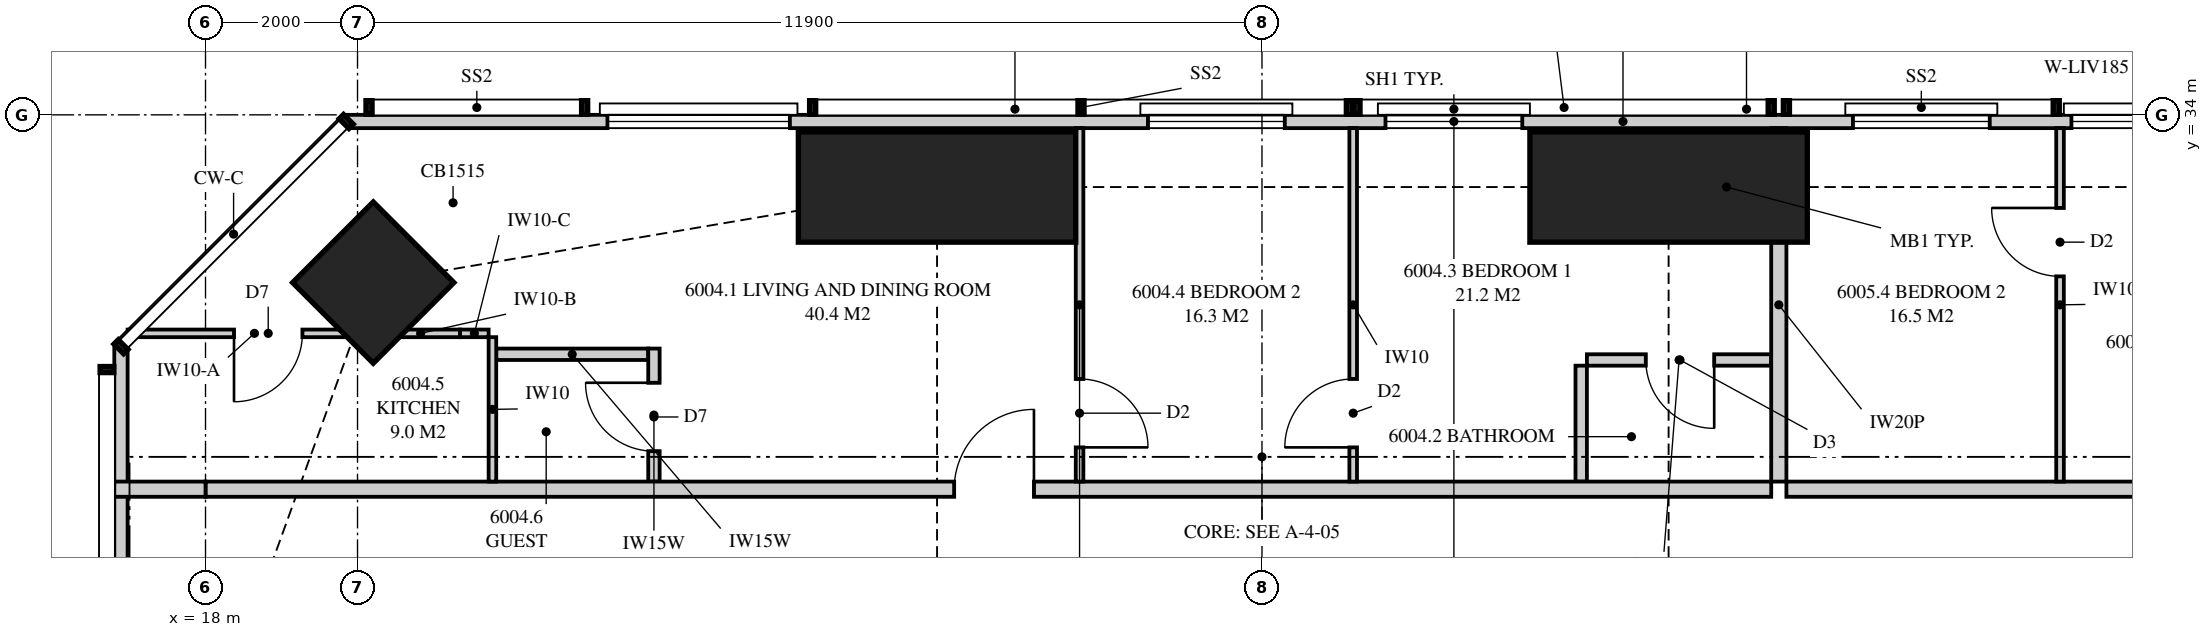
"""IFC4 building model, lengths in metres.
Left out: names, types, materials, properties, quantities, classifications, styles, units other than length and angle.
Written with IfcOpenShell. Run it as: python <this file> out.ifc"""

import sys

from ifc_helpers import new_model, si_unit, direction, frame, frame_2d, origin, origin_2d, place, context, subcontext, project, spatial, polyline, rectangle, hollow_rectangle, outline, extrude, element, fill, save


model = new_model("IFC4")
c1 = context("Model", 3, precision=1e-05, world=origin(), true_north=direction((0.0, 1.0)))
c2 = subcontext(c1, "Body", "Model", "MODEL_VIEW")
j1 = project(units=[si_unit("LENGTHUNIT", "METRE"), si_unit("PLANEANGLEUNIT", "RADIAN")], contexts=[c1])
p1 = place(None, origin())
s1 = spatial("IfcSite", under=j1, at=p1, CompositionType="ELEMENT")
p2 = place(p1, origin())
s2 = spatial("IfcBuilding", under=s1, at=p2, CompositionType="ELEMENT")
p3 = place(p2, frame((0.0, 0.0, 221.45)))
s3 = spatial("IfcBuildingStorey", under=s2, at=p3, CompositionType="ELEMENT", Elevation=221.45)
for number, where, z_axis, x_axis in (
    (1, (37.25, 33.05, 0.0), (0.0, 0.0, 1.0), (0.0, 1.0, 0.0)),
    (2, (27.625, 33.05, 0.0), (0.0, 0.0, 1.0), (0.0, 1.0, 0.0)),
):
    element("IfcColumn", number, at=place(p3, frame(where, z_axis=z_axis, x_axis=x_axis)), inside=s3, PredefinedType="COLUMN", context=c2, shape_type="SweptSolid", body=[
        extrude(rectangle(XDim=1.45, YDim=3.65, at=origin_2d()), origin(), (0.0, 0.0, 1.0), 3.5),
    ])
p4 = place(p3, frame((20.207, 31.793, 0.0), z_axis=(0.0, 0.0, 1.0), x_axis=(0.707106781187, -0.707106781187, 0.0)))
e3 = element("IfcColumn", 3, at=p4, inside=s3, PredefinedType="COLUMN", context=c2, shape_type="SweptSolid", body=[
    extrude(hollow_rectangle(XDim=1.5, YDim=1.5, WallThickness=0.125, at=origin_2d()), origin(), (0.0, 0.0, 1.0), 3.5),
])
p5 = place(p3, frame((53.449, 33.913, 0.0), z_axis=(0.0, 0.0, 1.0), x_axis=(-1.0, 0.0, 0.0)))
e4 = element("IfcWall", 4, at=p5, inside=s3, PredefinedType="SOLIDWALL", context=c2, shape_type="SweptSolid", body=[
    extrude(outline(polyline([(0.0, 0.0), (33.597, 0.0), (33.597, 3.26), (26.039, 3.26), (26.039, 2.3), (25.955, 2.3), (25.955, 3.26), (25.824, 3.26), (25.824, 2.3), (6.574, 2.3), (6.574, 3.26), (6.442, 3.26), (6.442, 2.3), (6.359, 2.3), (6.359, 3.26), (0.0, 3.26), (0.0, 0.0)])), frame((0.0, 0.087, 0.0), z_axis=(0.0, -1.0, 0.0), x_axis=(1.0, 0.0, 0.0)), (0.0, 0.0, 1.0), 0.175),
])
p6 = place(p5, frame((0.6, 0.0, 0.0)))
e5 = element("IfcOpeningElement", 5, at=p6, cuts=e4, PredefinedType="OPENING", context=c2, shape_type="SweptSolid", body=[
    extrude(rectangle(XDim=1.8, YDim=2.25, at=frame_2d((0.9, 1.125))), frame((0.0, 0.097, 0.0), z_axis=(0.0, -1.0, 0.0), x_axis=(1.0, 0.0, 0.0)), (0.0, 0.0, 1.0), 0.195),
])
p7 = place(p5, frame((8.499, 0.0, 0.4)))
e6 = element("IfcOpeningElement", 6, at=p7, cuts=e4, PredefinedType="OPENING", context=c2, shape_type="SweptSolid", body=[
    extrude(rectangle(XDim=2.4, YDim=1.85, at=frame_2d((1.2, 0.925))), frame((0.0, 0.097, 0.0), z_axis=(0.0, -1.0, 0.0), x_axis=(1.0, 0.0, 0.0)), (0.0, 0.0, 1.0), 0.195),
])
p8 = place(p5, frame((11.974, 0.0, 0.4)))
e7 = element("IfcOpeningElement", 7, at=p8, cuts=e4, PredefinedType="OPENING", context=c2, shape_type="SweptSolid", body=[
    extrude(rectangle(XDim=1.8, YDim=1.85, at=frame_2d((0.9, 0.925))), frame((0.0, 0.097, 0.0), z_axis=(0.0, -1.0, 0.0), x_axis=(1.0, 0.0, 0.0)), (0.0, 0.0, 1.0), 0.195),
])
p9 = place(p5, frame((18.124, 0.0, 0.4)))
e8 = element("IfcOpeningElement", 8, at=p9, cuts=e4, PredefinedType="OPENING", context=c2, shape_type="SweptSolid", body=[
    extrude(rectangle(XDim=1.8, YDim=1.85, at=frame_2d((0.9, 0.925))), frame((0.0, 0.097, 0.0), z_axis=(0.0, -1.0, 0.0), x_axis=(1.0, 0.0, 0.0)), (0.0, 0.0, 1.0), 0.195),
])
p10 = place(p5, frame((21.249, 0.0, 0.4)))
e9 = element("IfcOpeningElement", 9, at=p10, cuts=e4, PredefinedType="OPENING", context=c2, shape_type="SweptSolid", body=[
    extrude(rectangle(XDim=1.8, YDim=1.85, at=frame_2d((0.9, 0.925))), frame((0.0, 0.097, 0.0), z_axis=(0.0, -1.0, 0.0), x_axis=(1.0, 0.0, 0.0)), (0.0, 0.0, 1.0), 0.195),
])
p11 = place(p5, frame((27.76, 0.0, 0.4)))
e10 = element("IfcOpeningElement", 10, at=p11, cuts=e4, PredefinedType="OPENING", context=c2, shape_type="SweptSolid", body=[
    extrude(rectangle(XDim=2.4, YDim=1.85, at=frame_2d((1.2, 0.925))), frame((0.0, 0.097, 0.0), z_axis=(0.0, -1.0, 0.0), x_axis=(1.0, 0.0, 0.0)), (0.0, 0.0, 1.0), 0.195),
])
p12 = place(p3, frame((16.887, 30.949, 0.0), z_axis=(0.0, 0.0, 1.0), x_axis=(0.0, -1.0, 0.0)))
e11 = element("IfcWall", 11, at=p12, inside=s3, PredefinedType="SOLIDWALL", context=c2, shape_type="SweptSolid", body=[
    extrude(outline(polyline([(0.0, 0.0), (27.897, 0.0), (27.897, 3.26), (18.148, 3.26), (18.148, 2.3), (18.125, 2.3), (18.125, 3.26), (17.949, 3.26), (17.949, 2.3), (5.949, 2.3), (5.949, 3.26), (0.0, 3.26), (0.0, 0.0)])), frame((0.0, 0.087, 0.0), z_axis=(0.0, -1.0, 0.0), x_axis=(1.0, 0.0, 0.0)), (0.0, 0.0, 1.0), 0.175),
])
p13 = place(p12, frame((11.849, 0.0, 0.4)))
e12 = element("IfcOpeningElement", 12, at=p13, cuts=e11, PredefinedType="OPENING", context=c2, shape_type="SweptSolid", body=[
    extrude(rectangle(XDim=1.2, YDim=1.85, at=frame_2d((0.6, 0.925))), frame((0.0, 0.097, 0.0), z_axis=(0.0, -1.0, 0.0), x_axis=(1.0, 0.0, 0.0)), (0.0, 0.0, 1.0), 0.195),
])
p14 = place(p12, frame((23.999, 0.0, 0.4)))
e13 = element("IfcOpeningElement", 13, at=p14, cuts=e11, PredefinedType="OPENING", context=c2, shape_type="SweptSolid", body=[
    extrude(rectangle(XDim=1.2, YDim=1.85, at=frame_2d((0.6, 0.925))), frame((0.0, 0.097, 0.0), z_axis=(0.0, -1.0, 0.0), x_axis=(1.0, 0.0, 0.0)), (0.0, 0.0, 1.0), 0.195),
])
p15 = place(p3, frame((38.7, 33.825, 0.0), z_axis=(0.0, 0.0, 1.0), x_axis=(0.0, -1.0, 0.0)))
e14 = element("IfcWall", 14, at=p15, inside=s3, PredefinedType="PARTITIONING", context=c2, shape_type="SweptSolid", body=[
    extrude(outline(polyline([(0.529, 2.3), (0.0, 2.3), (0.0, 0.0), (0.529, 0.0), (0.529, 0.052), (1.021, 0.052), (1.021, 0.0), (4.65, 0.0), (4.65, 3.26), (1.685, 3.26), (1.685, 2.3), (1.021, 2.3), (1.021, 2.249), (0.529, 2.249), (0.529, 2.3)])), frame((0.0, 0.1, 0.0), z_axis=(0.0, -1.0, 0.0), x_axis=(1.0, 0.0, 0.0)), (0.0, 0.0, 1.0), 0.2),
])
p16 = place(p3, frame((18.0, 29.075, 0.0), z_axis=(0.0, 0.0, 1.0), x_axis=(1.0, 0.0, 0.0)))
e15 = element("IfcWall", 15, at=p16, inside=s3, PredefinedType="PARTITIONING", context=c2, shape_type="SweptSolid", body=[
    extrude(outline(polyline([(0.0, 0.0), (20.6, 0.0), (20.6, 3.26), (20.56, 3.26), (20.56, 2.66), (17.94, 2.66), (17.94, 3.26), (10.935, 3.26), (10.935, 2.66), (8.315, 2.66), (8.315, 3.26), (2.192, 3.26), (2.192, 2.3), (0.256, 2.3), (0.256, 3.26), (0.0, 3.26), (0.0, 0.0)])), frame((0.0, 0.1, 0.0), z_axis=(0.0, -1.0, 0.0), x_axis=(1.0, 0.0, 0.0)), (0.0, 0.0, 1.0), 0.2),
])
p17 = place(p16, frame((9.85, 0.0, 0.0)))
e16 = element("IfcOpeningElement", 16, at=p17, cuts=e15, PredefinedType="OPENING", context=c2, shape_type="SweptSolid", body=[
    extrude(rectangle(XDim=1.05, YDim=2.2, at=frame_2d((0.525, 1.1))), frame((0.0, 0.11, 0.0), z_axis=(0.0, -1.0, 0.0), x_axis=(1.0, 0.0, 0.0)), (0.0, 0.0, 1.0), 0.22),
])
p18 = place(p3, frame((36.175, 30.775, 0.0), z_axis=(0.0, 0.0, 1.0), x_axis=(1.0, 0.0, 0.0)))
e17 = element("IfcWall", 17, at=p18, inside=s3, PredefinedType="PLUMBINGWALL", context=c2, shape_type="SweptSolid", body=[
    extrude(outline(polyline([(0.0, 0.0), (2.425, 0.0), (2.425, 3.26), (2.36, 3.26), (2.36, 2.66), (0.0, 2.66), (0.0, 3.26), (0.0, 0.0)])), frame((0.0, 0.075, 0.0), z_axis=(0.0, -1.0, 0.0), x_axis=(1.0, 0.0, 0.0)), (0.0, 0.0, 1.0), 0.15),
])
p19 = place(p18, frame((0.775, 0.0, 0.0)))
e18 = element("IfcOpeningElement", 18, at=p19, cuts=e17, PredefinedType="OPENING", context=c2, shape_type="SweptSolid", body=[
    extrude(rectangle(XDim=0.9, YDim=2.1, at=frame_2d((0.45, 1.05))), frame((0.0, 0.085, 0.0), z_axis=(0.0, -1.0, 0.0), x_axis=(1.0, 0.0, 0.0)), (0.0, 0.0, 1.0), 0.17),
])
p20 = place(p3, frame((36.1, 30.7, 0.0), z_axis=(0.0, 0.0, 1.0), x_axis=(0.0, -1.0, 0.0)))
e19 = element("IfcWall", 19, at=p20, inside=s3, PredefinedType="PLUMBINGWALL", context=c2, shape_type="SweptSolid", body=[
    extrude(outline(polyline([(0.0, 0.0), (1.525, 0.0), (1.525, 3.26), (1.525, 2.66), (0.0, 2.66), (0.0, 3.26), (0.0, 0.0)])), frame((0.0, 0.075, 0.0), z_axis=(0.0, -1.0, 0.0), x_axis=(1.0, 0.0, 0.0)), (0.0, 0.0, 1.0), 0.15),
])
p21 = place(p3, frame((33.1, 33.825, 0.0), z_axis=(0.0, 0.0, 1.0), x_axis=(0.0, -1.0, 0.0)))
e20 = element("IfcWall", 20, at=p21, inside=s3, PredefinedType="PARTITIONING", context=c2, shape_type="SweptSolid", body=[
    extrude(outline(polyline([(0.0, 0.0), (4.65, 0.0), (4.65, 3.26), (1.635, 3.26), (1.635, 2.3), (0.0, 2.3), (0.0, 3.26), (0.0, 0.0)])), frame((0.0, 0.05, 0.0), z_axis=(0.0, -1.0, 0.0), x_axis=(1.0, 0.0, 0.0)), (0.0, 0.0, 1.0), 0.1),
])
p22 = place(p21, frame((3.3, 0.0, 0.0)))
e21 = element("IfcOpeningElement", 21, at=p22, cuts=e20, PredefinedType="OPENING", context=c2, shape_type="SweptSolid", body=[
    extrude(rectangle(XDim=0.9, YDim=2.1, at=frame_2d((0.45, 1.05))), frame((0.0, 0.06, 0.0), z_axis=(0.0, -1.0, 0.0), x_axis=(1.0, 0.0, 0.0)), (0.0, 0.0, 1.0), 0.12),
])
p23 = place(p3, frame((29.5, 33.825, 0.0), z_axis=(0.0, 0.0, 1.0), x_axis=(0.0, -1.0, 0.0)))
e22 = element("IfcWall", 22, at=p23, inside=s3, PredefinedType="PARTITIONING", context=c2, shape_type="SweptSolid", body=[
    extrude(outline(polyline([(0.0, 0.0), (4.65, 0.0), (4.65, 3.26), (1.635, 3.26), (1.635, 2.3), (0.0, 2.3), (0.0, 3.26), (0.0, 0.0)])), frame((0.0, 0.05, 0.0), z_axis=(0.0, -1.0, 0.0), x_axis=(1.0, 0.0, 0.0)), (0.0, 0.0, 1.0), 0.1),
])
p24 = place(p23, frame((3.3, 0.0, 0.0)))
e23 = element("IfcOpeningElement", 23, at=p24, cuts=e22, PredefinedType="OPENING", context=c2, shape_type="SweptSolid", body=[
    extrude(rectangle(XDim=0.9, YDim=2.1, at=frame_2d((0.45, 1.05))), frame((0.0, 0.06, 0.0), z_axis=(0.0, -1.0, 0.0), x_axis=(1.0, 0.0, 0.0)), (0.0, 0.0, 1.0), 0.12),
])
p25 = place(p3, frame((16.975, 31.125, 0.0), z_axis=(0.0, 0.0, 1.0), x_axis=(1.0, 0.0, 0.0)))
e24 = element("IfcWall", 24, at=p25, inside=s3, PredefinedType="PARTITIONING", context=c2, shape_type="SweptSolid", body=[
    extrude(outline(polyline([(0.0, 0.0), (3.337, 0.0), (3.337, 2.3), (2.076, 2.3), (2.076, 3.26), (0.0, 3.26), (0.0, 0.0)])), frame((0.0, 0.05, 0.0), z_axis=(0.0, -1.0, 0.0), x_axis=(1.0, 0.0, 0.0)), (0.0, 0.0, 1.0), 0.1),
])
p26 = place(p25, frame((1.4, 0.0, 0.0)))
e25 = element("IfcOpeningElement", 25, at=p26, cuts=e24, PredefinedType="OPENING", context=c2, shape_type="SweptSolid", body=[
    extrude(rectangle(XDim=0.9, YDim=2.1, at=frame_2d((0.45, 1.05))), frame((0.0, 0.06, 0.0), z_axis=(0.0, -1.0, 0.0), x_axis=(1.0, 0.0, 0.0)), (0.0, 0.0, 1.0), 0.12),
])
p27 = place(p3, frame((20.312, 31.125, 0.0), z_axis=(0.0, 0.0, 1.0), x_axis=(1.0, 0.0, 0.0)))
e26 = element("IfcWall", 26, at=p27, inside=s3, PredefinedType="PARTITIONING", context=c2, shape_type="SweptSolid", body=[
    extrude(rectangle(XDim=1.037, YDim=0.1, at=frame_2d((0.519, 0.0))), origin(), (0.0, 0.0, 1.0), 2.3),
])
p28 = place(p3, frame((21.349, 31.125, 0.0), z_axis=(0.0, 0.0, 1.0), x_axis=(1.0, 0.0, 0.0)))
e27 = element("IfcWall", 27, at=p28, inside=s3, PredefinedType="PARTITIONING", context=c2, shape_type="SweptSolid", body=[
    extrude(outline(polyline([(0.0, 0.0), (0.376, 0.0), (0.376, 3.26), (0.064, 3.26), (0.064, 2.3), (0.0, 2.3), (0.0, 0.0)])), frame((0.0, 0.05, 0.0), z_axis=(0.0, -1.0, 0.0), x_axis=(1.0, 0.0, 0.0)), (0.0, 0.0, 1.0), 0.1),
])
p29 = place(p3, frame((21.775, 31.075, 0.0), z_axis=(0.0, 0.0, 1.0), x_axis=(0.0, -1.0, 0.0)))
e28 = element("IfcWall", 28, at=p29, inside=s3, PredefinedType="PARTITIONING", context=c2, shape_type="SweptSolid", body=[
    extrude(rectangle(XDim=1.9, YDim=0.1, at=frame_2d((0.95, 0.0))), origin(), (0.0, 0.0, 1.0), 3.26),
])
p30 = place(p3, frame((38.8, 29.075, 0.0), z_axis=(0.0, 0.0, 1.0), x_axis=(1.0, 0.0, 0.0)))
e29 = element("IfcWall", 29, at=p30, inside=s3, PredefinedType="PARTITIONING", context=c2, shape_type="SweptSolid", body=[
    extrude(outline(polyline([(0.0, 0.0), (7.075, 0.0), (7.075, 3.26), (7.075, 2.66), (6.765, 2.66), (6.765, 3.26), (0.0, 3.26), (0.0, 0.0)])), frame((0.0, 0.1, 0.0), z_axis=(0.0, -1.0, 0.0), x_axis=(1.0, 0.0, 0.0)), (0.0, 0.0, 1.0), 0.2),
])
p31 = place(p30, frame((5.875, 0.0, 0.0)))
e30 = element("IfcOpeningElement", 30, at=p31, cuts=e29, PredefinedType="OPENING", context=c2, shape_type="SweptSolid", body=[
    extrude(rectangle(XDim=1.05, YDim=2.2, at=frame_2d((0.525, 1.1))), frame((0.0, 0.11, 0.0), z_axis=(0.0, -1.0, 0.0), x_axis=(1.0, 0.0, 0.0)), (0.0, 0.0, 1.0), 0.22),
])
p32 = place(p3, frame((42.4, 33.825, 0.0), z_axis=(0.0, 0.0, 1.0), x_axis=(0.0, -1.0, 0.0)))
e31 = element("IfcWall", 31, at=p32, inside=s3, PredefinedType="PARTITIONING", context=c2, shape_type="SweptSolid", body=[
    extrude(outline(polyline([(0.0, 0.0), (4.65, 0.0), (4.65, 3.26), (1.635, 3.26), (1.635, 2.3), (0.0, 2.3), (0.0, 3.26), (0.0, 0.0)])), frame((0.0, 0.05, 0.0), z_axis=(0.0, -1.0, 0.0), x_axis=(1.0, 0.0, 0.0)), (0.0, 0.0, 1.0), 0.1),
])
p33 = place(p32, frame((1.05, 0.0, 0.0)))
e32 = element("IfcOpeningElement", 32, at=p33, cuts=e31, PredefinedType="OPENING", context=c2, shape_type="SweptSolid", body=[
    extrude(rectangle(XDim=0.9, YDim=2.1, at=frame_2d((0.45, 1.05))), frame((0.0, 0.06, 0.0), z_axis=(0.0, -1.0, 0.0), x_axis=(1.0, 0.0, 0.0)), (0.0, 0.0, 1.0), 0.12),
])
p34 = place(p3, frame((16.8, 29.075, 0.0), z_axis=(0.0, 0.0, 1.0), x_axis=(1.0, 0.0, 0.0)))
e33 = element("IfcWall", 33, at=p34, inside=s3, PredefinedType="PARTITIONING", context=c2, shape_type="SweptSolid", body=[
    extrude(rectangle(XDim=1.2, YDim=0.2, at=frame_2d((0.6, 0.0))), origin(), (0.0, 0.0, 1.0), 3.26),
])
p35 = place(p3, frame((23.9, 29.175, 0.0), z_axis=(0.0, 0.0, 1.0), x_axis=(0.0, 1.0, 0.0)))
e34 = element("IfcWall", 34, at=p35, inside=s3, PredefinedType="PLUMBINGWALL", context=c2, shape_type="SweptSolid", body=[
    extrude(rectangle(XDim=1.75, YDim=0.15, at=frame_2d((0.875, 0.0))), origin(), (0.0, 0.0, 1.0), 3.26),
])
p36 = place(p35, frame((0.4, 0.0, 0.0)))
e35 = element("IfcOpeningElement", 35, at=p36, cuts=e34, PredefinedType="OPENING", context=c2, shape_type="SweptSolid", body=[
    extrude(rectangle(XDim=0.9, YDim=2.1, at=frame_2d((0.45, 1.05))), frame((0.0, 0.085, 0.0), z_axis=(0.0, -1.0, 0.0), x_axis=(1.0, 0.0, 0.0)), (0.0, 0.0, 1.0), 0.17),
])
p37 = place(p3, frame((21.825, 30.85, 0.0), z_axis=(0.0, 0.0, 1.0), x_axis=(1.0, 0.0, 0.0)))
e36 = element("IfcWall", 36, at=p37, inside=s3, PredefinedType="PLUMBINGWALL", context=c2, shape_type="SweptSolid", body=[
    extrude(rectangle(XDim=2.0, YDim=0.15, at=frame_2d((1.0, 0.0))), origin(), (0.0, 0.0, 1.0), 3.26),
])
p38 = place(p7, origin())
e37 = element("IfcWindow", 37, at=p38, inside=s3, PartitioningType="SINGLE_PANEL", PredefinedType="WINDOW", context=c2, shape_type="SweptSolid", body=[
    extrude(rectangle(XDim=2.4, YDim=1.85, at=frame_2d((1.2, 0.925))), frame((0.0, 0.03, 0.0), z_axis=(0.0, -1.0, 0.0), x_axis=(1.0, 0.0, 0.0)), (0.0, 0.0, 1.0), 0.06),
])
fill(e6, e37)
p39 = place(p8, origin())
e38 = element("IfcWindow", 38, at=p39, inside=s3, PartitioningType="SINGLE_PANEL", PredefinedType="WINDOW", context=c2, shape_type="SweptSolid", body=[
    extrude(rectangle(XDim=1.8, YDim=1.85, at=frame_2d((0.9, 0.925))), frame((0.0, 0.03, 0.0), z_axis=(0.0, -1.0, 0.0), x_axis=(1.0, 0.0, 0.0)), (0.0, 0.0, 1.0), 0.06),
])
fill(e7, e38)
p40 = place(p9, origin())
e39 = element("IfcWindow", 39, at=p40, inside=s3, PartitioningType="SINGLE_PANEL", PredefinedType="WINDOW", context=c2, shape_type="SweptSolid", body=[
    extrude(rectangle(XDim=1.8, YDim=1.85, at=frame_2d((0.9, 0.925))), frame((0.0, 0.03, 0.0), z_axis=(0.0, -1.0, 0.0), x_axis=(1.0, 0.0, 0.0)), (0.0, 0.0, 1.0), 0.06),
])
fill(e8, e39)
p41 = place(p10, origin())
e40 = element("IfcWindow", 40, at=p41, inside=s3, PartitioningType="SINGLE_PANEL", PredefinedType="WINDOW", context=c2, shape_type="SweptSolid", body=[
    extrude(rectangle(XDim=1.8, YDim=1.85, at=frame_2d((0.9, 0.925))), frame((0.0, 0.03, 0.0), z_axis=(0.0, -1.0, 0.0), x_axis=(1.0, 0.0, 0.0)), (0.0, 0.0, 1.0), 0.06),
])
fill(e9, e40)
p42 = place(p11, origin())
e41 = element("IfcWindow", 41, at=p42, inside=s3, PartitioningType="SINGLE_PANEL", PredefinedType="WINDOW", context=c2, shape_type="SweptSolid", body=[
    extrude(rectangle(XDim=2.4, YDim=1.85, at=frame_2d((1.2, 0.925))), frame((0.0, 0.03, 0.0), z_axis=(0.0, -1.0, 0.0), x_axis=(1.0, 0.0, 0.0)), (0.0, 0.0, 1.0), 0.06),
])
fill(e10, e41)
p43 = place(p17, origin())
e42 = element("IfcDoor", 42, at=p43, inside=s3, OperationType="SINGLE_SWING_RIGHT", PredefinedType="DOOR", context=c2, shape_type="SweptSolid", body=[
    extrude(rectangle(XDim=1.05, YDim=2.2, at=frame_2d((0.525, 1.1))), frame((0.0, 0.025, 0.0), z_axis=(0.0, -1.0, 0.0), x_axis=(1.0, 0.0, 0.0)), (0.0, 0.0, 1.0), 0.05),
])
fill(e16, e42)
p44 = place(p19, frame((0.9, 0.0, 0.0), z_axis=(0.0, 0.0, 1.0), x_axis=(-1.0, 0.0, 0.0)))
e43 = element("IfcDoor", 43, at=p44, inside=s3, OperationType="SINGLE_SWING_LEFT", PredefinedType="DOOR", context=c2, shape_type="SweptSolid", body=[
    extrude(rectangle(XDim=0.9, YDim=2.1, at=frame_2d((0.45, 1.05))), frame((0.0, 0.025, 0.0), z_axis=(0.0, -1.0, 0.0), x_axis=(1.0, 0.0, 0.0)), (0.0, 0.0, 1.0), 0.05),
])
fill(e18, e43)
p45 = place(p22, frame((0.9, 0.0, 0.0), z_axis=(0.0, 0.0, 1.0), x_axis=(-1.0, 0.0, 0.0)))
e44 = element("IfcDoor", 44, at=p45, inside=s3, OperationType="SINGLE_SWING_LEFT", PredefinedType="DOOR", context=c2, shape_type="SweptSolid", body=[
    extrude(rectangle(XDim=0.9, YDim=2.1, at=frame_2d((0.45, 1.05))), frame((0.0, 0.025, 0.0), z_axis=(0.0, -1.0, 0.0), x_axis=(1.0, 0.0, 0.0)), (0.0, 0.0, 1.0), 0.05),
])
fill(e21, e44)
p46 = place(p24, origin())
e45 = element("IfcDoor", 45, at=p46, inside=s3, OperationType="SINGLE_SWING_RIGHT", PredefinedType="DOOR", context=c2, shape_type="SweptSolid", body=[
    extrude(rectangle(XDim=0.9, YDim=2.1, at=frame_2d((0.45, 1.05))), frame((0.0, 0.025, 0.0), z_axis=(0.0, -1.0, 0.0), x_axis=(1.0, 0.0, 0.0)), (0.0, 0.0, 1.0), 0.05),
])
fill(e23, e45)
p47 = place(p26, frame((0.9, 0.0, 0.0), z_axis=(0.0, 0.0, 1.0), x_axis=(-1.0, 0.0, 0.0)))
e46 = element("IfcDoor", 46, at=p47, inside=s3, OperationType="SINGLE_SWING_RIGHT", PredefinedType="DOOR", context=c2, shape_type="SweptSolid", body=[
    extrude(rectangle(XDim=0.9, YDim=2.1, at=frame_2d((0.45, 1.05))), frame((0.0, 0.025, 0.0), z_axis=(0.0, -1.0, 0.0), x_axis=(1.0, 0.0, 0.0)), (0.0, 0.0, 1.0), 0.05),
])
fill(e25, e46)
p48 = place(p33, frame((0.9, 0.0, 0.0), z_axis=(0.0, 0.0, 1.0), x_axis=(-1.0, 0.0, 0.0)))
e47 = element("IfcDoor", 47, at=p48, inside=s3, OperationType="SINGLE_SWING_RIGHT", PredefinedType="DOOR", context=c2, shape_type="SweptSolid", body=[
    extrude(rectangle(XDim=0.9, YDim=2.1, at=frame_2d((0.45, 1.05))), frame((0.0, 0.025, 0.0), z_axis=(0.0, -1.0, 0.0), x_axis=(1.0, 0.0, 0.0)), (0.0, 0.0, 1.0), 0.05),
])
fill(e32, e47)
p49 = place(p36, origin())
e48 = element("IfcDoor", 48, at=p49, inside=s3, OperationType="SINGLE_SWING_RIGHT", PredefinedType="DOOR", context=c2, shape_type="SweptSolid", body=[
    extrude(rectangle(XDim=0.9, YDim=2.1, at=frame_2d((0.45, 1.05))), frame((0.0, 0.025, 0.0), z_axis=(0.0, -1.0, 0.0), x_axis=(1.0, 0.0, 0.0)), (0.0, 0.0, 1.0), 0.05),
])
fill(e35, e48)
save(model, sys.argv[1])
